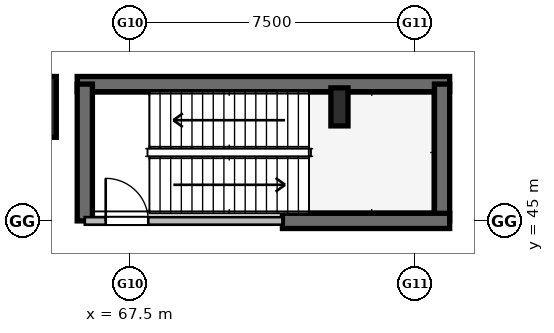
"""IFC4 building model, lengths in metres.
Left out: names, types, materials, properties, quantities, classifications, styles, units other than length and angle.
Written with IfcOpenShell. Run it as: python <this file> out.ifc"""

import sys

from ifc_helpers import new_model, si_unit, direction, frame, frame_2d, origin, origin_2d, place, context, subcontext, project, spatial, rectangle, hollow_rectangle, i_section, extrude, element, fill, save


model = new_model("IFC4")
c1 = context("Model", 3, precision=1e-05, world=origin(), true_north=direction((0.0, 1.0)))
c2 = subcontext(c1, "Body", "Model", "MODEL_VIEW")
j1 = project(units=[si_unit("LENGTHUNIT", "METRE"), si_unit("PLANEANGLEUNIT", "RADIAN")], contexts=[c1])
p1 = place(None, origin())
s1 = spatial("IfcSite", under=j1, at=p1, CompositionType="ELEMENT")
p2 = place(p1, origin())
s2 = spatial("IfcBuilding", under=s1, at=p2, CompositionType="ELEMENT")
p3 = place(p2, frame((0.0, 0.0, -5.4)))
s3 = spatial("IfcBuildingStorey", under=s2, at=p3, CompositionType="ELEMENT", Elevation=-5.4)
p4 = place(p3, frame((64.75, 48.0, 0.0), z_axis=(0.0, 0.0, 1.0), x_axis=(1.0, 0.0, 0.0)))
e1 = element("IfcColumn", 1, at=p4, inside=s3, PredefinedType="COLUMN", context=c2, shape_type="SweptSolid", body=[
    extrude(hollow_rectangle(XDim=1.6, YDim=1.6, WallThickness=0.04, at=origin_2d()), origin(), (0.0, 0.0, 1.0), 5.4),
])
p5 = place(p3, frame((73.0, 48.0, 0.0), z_axis=(0.0, 0.0, 1.0), x_axis=(1.0, 0.0, 0.0)))
e2 = element("IfcColumn", 2, at=p5, inside=s3, PredefinedType="COLUMN", context=c2, shape_type="SweptSolid", body=[
    extrude(i_section(OverallWidth=0.45, OverallDepth=1.0, WebThickness=0.022, FlangeThickness=0.04, at=origin_2d()), origin(), (0.0, 0.0, 1.0), 5.4),
])
p6 = place(p3, frame((66.1, 48.6, 0.0), z_axis=(0.0, 0.0, 1.0), x_axis=(1.0, 0.0, 0.0)))
e3 = element("IfcWall", 3, at=p6, inside=s3, PredefinedType="SHEAR", context=c2, shape_type="SweptSolid", body=[
    extrude(rectangle(XDim=9.8, YDim=0.4, at=frame_2d((4.9, 0.0))), origin(), (0.0, 0.0, 1.0), 5.4),
])
for number, where, z_axis, x_axis in (
    (4, (66.3, 45.0, 0.0), (0.0, 0.0, 1.0), (0.0, 1.0, 0.0)),
    (5, (75.7, 45.0, 0.0), (0.0, 0.0, 1.0), (0.0, 1.0, 0.0)),
):
    element("IfcWall", number, at=place(p3, frame(where, z_axis=z_axis, x_axis=x_axis)), inside=s3, PredefinedType="SHEAR", context=c2, shape_type="SweptSolid", body=[
        extrude(rectangle(XDim=3.6, YDim=0.4, at=frame_2d((1.8, 0.0))), origin(), (0.0, 0.0, 1.0), 5.4),
    ])
p7 = place(p3, frame((71.5, 45.0, 0.0), z_axis=(0.0, 0.0, 1.0), x_axis=(1.0, 0.0, 0.0)))
e6 = element("IfcWall", 6, at=p7, inside=s3, PredefinedType="SHEAR", context=c2, shape_type="SweptSolid", body=[
    extrude(rectangle(XDim=4.4, YDim=0.4, at=frame_2d((2.2, 0.0))), origin(), (0.0, 0.0, 1.0), 5.4),
])
p8 = place(p3, frame((66.3, 45.0, 0.0), z_axis=(0.0, 0.0, 1.0), x_axis=(1.0, 0.0, 0.0)))
e7 = element("IfcWall", 7, at=p8, inside=s3, PredefinedType="PARTITIONING", context=c2, shape_type="SweptSolid", body=[
    extrude(rectangle(XDim=5.2, YDim=0.2, at=frame_2d((2.6, 0.0))), origin(), (0.0, 0.0, 1.0), 5.08),
])
p9 = place(p8, frame((0.55, 0.0, 0.0)))
e8 = element("IfcOpeningElement", 8, at=p9, cuts=e7, PredefinedType="OPENING", context=c2, shape_type="SweptSolid", body=[
    extrude(rectangle(XDim=1.12, YDim=2.1, at=frame_2d((0.56, 1.05))), frame((0.0, 0.11, 0.0), z_axis=(0.0, -1.0, 0.0), x_axis=(1.0, 0.0, 0.0)), (0.0, 0.0, 1.0), 0.22),
])
p10 = place(p9, origin())
e9 = element("IfcDoor", 9, at=p10, inside=s3, OperationType="SINGLE_SWING_RIGHT", PredefinedType="DOOR", context=c2, shape_type="SweptSolid", body=[
    extrude(rectangle(XDim=1.12, YDim=2.1, at=frame_2d((0.56, 1.05))), frame((0.0, 0.025, 0.0), z_axis=(0.0, -1.0, 0.0), x_axis=(1.0, 0.0, 0.0)), (0.0, 0.0, 1.0), 0.05),
])
fill(e8, e9)
save(model, sys.argv[1])
